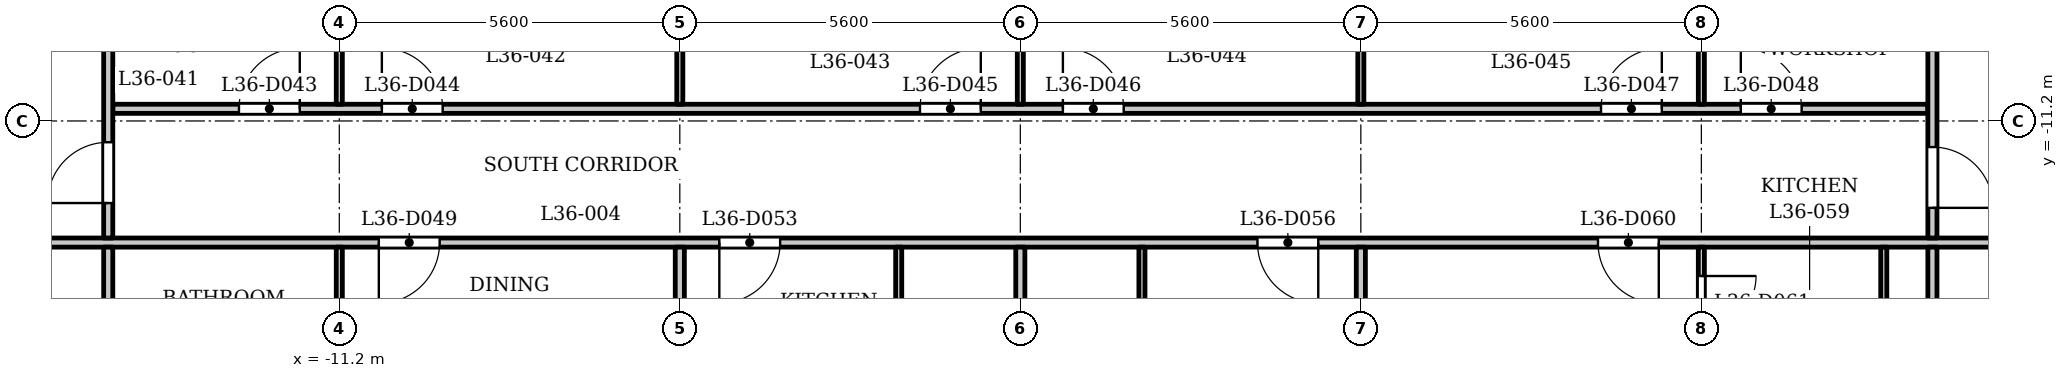
"""IFC4 building model, lengths in metres.
Left out: names, types, materials, properties, quantities, classifications, styles, units other than length and angle.
Written with IfcOpenShell. Run it as: python <this file> out.ifc"""

import sys

from ifc_helpers import new_model, si_unit, direction, frame, frame_2d, origin, place, context, subcontext, project, spatial, rectangle, extrude, element, fill, save


model = new_model("IFC4")
c1 = context("Model", 3, precision=1e-05, world=origin(), true_north=direction((0.0, 1.0)))
c2 = subcontext(c1, "Body", "Model", "MODEL_VIEW")
j1 = project(units=[si_unit("LENGTHUNIT", "METRE"), si_unit("PLANEANGLEUNIT", "RADIAN")], contexts=[c1])
p1 = place(None, origin())
s1 = spatial("IfcSite", under=j1, at=p1, CompositionType="ELEMENT")
p2 = place(p1, origin())
s2 = spatial("IfcBuilding", under=s1, at=p2, CompositionType="ELEMENT")
p3 = place(p2, frame((0.0, 0.0, 143.1)))
s3 = spatial("IfcBuildingStorey", under=s2, at=p3, CompositionType="ELEMENT", Elevation=143.1)
p4 = place(p3, frame((-17.4, -13.2, 0.0), z_axis=(0.0, 0.0, 1.0), x_axis=(1.0, 0.0, 0.0)))
e1 = element("IfcWall", 1, at=p4, inside=s3, PredefinedType="PARTITIONING", context=c2, shape_type="SweptSolid", body=[
    extrude(rectangle(XDim=34.8, YDim=0.15, at=frame_2d((17.4, 0.0))), origin(), (0.0, 0.0, 1.0), 3.2),
])
p5 = place(p4, frame((0.15, 0.0, 0.0)))
e2 = element("IfcOpeningElement", 2, at=p5, cuts=e1, PredefinedType="OPENING", context=c2, shape_type="SweptSolid", body=[
    extrude(rectangle(XDim=1.0, YDim=2.1, at=frame_2d((0.5, 1.05))), frame((0.0, 0.085, 0.0), z_axis=(0.0, -1.0, 0.0), x_axis=(1.0, 0.0, 0.0)), (0.0, 0.0, 1.0), 0.17),
])
p6 = place(p4, frame((33.55, 0.0, 0.0)))
e3 = element("IfcOpeningElement", 3, at=p6, cuts=e1, PredefinedType="OPENING", context=c2, shape_type="SweptSolid", body=[
    extrude(rectangle(XDim=1.0, YDim=2.1, at=frame_2d((0.5, 1.05))), frame((0.0, 0.085, 0.0), z_axis=(0.0, -1.0, 0.0), x_axis=(1.0, 0.0, 0.0)), (0.0, 0.0, 1.0), 0.17),
])
p7 = place(p4, frame((6.85, 0.0, 0.0)))
e4 = element("IfcOpeningElement", 4, at=p7, cuts=e1, PredefinedType="OPENING", context=c2, shape_type="SweptSolid", body=[
    extrude(rectangle(XDim=1.0, YDim=2.1, at=frame_2d((0.5, 1.05))), frame((0.0, 0.085, 0.0), z_axis=(0.0, -1.0, 0.0), x_axis=(1.0, 0.0, 0.0)), (0.0, 0.0, 1.0), 0.17),
])
p8 = place(p4, frame((12.45, 0.0, 0.0)))
e5 = element("IfcOpeningElement", 5, at=p8, cuts=e1, PredefinedType="OPENING", context=c2, shape_type="SweptSolid", body=[
    extrude(rectangle(XDim=1.0, YDim=2.1, at=frame_2d((0.5, 1.05))), frame((0.0, 0.085, 0.0), z_axis=(0.0, -1.0, 0.0), x_axis=(1.0, 0.0, 0.0)), (0.0, 0.0, 1.0), 0.17),
])
p9 = place(p4, frame((21.3, 0.0, 0.0)))
e6 = element("IfcOpeningElement", 6, at=p9, cuts=e1, PredefinedType="OPENING", context=c2, shape_type="SweptSolid", body=[
    extrude(rectangle(XDim=1.0, YDim=2.1, at=frame_2d((0.5, 1.05))), frame((0.0, 0.085, 0.0), z_axis=(0.0, -1.0, 0.0), x_axis=(1.0, 0.0, 0.0)), (0.0, 0.0, 1.0), 0.17),
])
p10 = place(p4, frame((26.9, 0.0, 0.0)))
e7 = element("IfcOpeningElement", 7, at=p10, cuts=e1, PredefinedType="OPENING", context=c2, shape_type="SweptSolid", body=[
    extrude(rectangle(XDim=1.0, YDim=2.1, at=frame_2d((0.5, 1.05))), frame((0.0, 0.085, 0.0), z_axis=(0.0, -1.0, 0.0), x_axis=(1.0, 0.0, 0.0)), (0.0, 0.0, 1.0), 0.17),
])
p11 = place(p3, frame((-14.925, -11.0, 0.0), z_axis=(0.0, 0.0, 1.0), x_axis=(1.0, 0.0, 0.0)))
e8 = element("IfcWall", 8, at=p11, inside=s3, PredefinedType="PARTITIONING", context=c2, shape_type="SweptSolid", body=[
    extrude(rectangle(XDim=29.85, YDim=0.15, at=frame_2d((14.925, 0.0))), origin(), (0.0, 0.0, 1.0), 3.2),
])
p12 = place(p11, frame((2.075, 0.0, 0.0)))
e9 = element("IfcOpeningElement", 9, at=p12, cuts=e8, PredefinedType="OPENING", context=c2, shape_type="SweptSolid", body=[
    extrude(rectangle(XDim=1.0, YDim=2.1, at=frame_2d((0.5, 1.05))), frame((0.0, 0.085, 0.0), z_axis=(0.0, -1.0, 0.0), x_axis=(1.0, 0.0, 0.0)), (0.0, 0.0, 1.0), 0.17),
])
p13 = place(p11, frame((4.425, 0.0, 0.0)))
e10 = element("IfcOpeningElement", 10, at=p13, cuts=e8, PredefinedType="OPENING", context=c2, shape_type="SweptSolid", body=[
    extrude(rectangle(XDim=1.0, YDim=2.1, at=frame_2d((0.5, 1.05))), frame((0.0, 0.085, 0.0), z_axis=(0.0, -1.0, 0.0), x_axis=(1.0, 0.0, 0.0)), (0.0, 0.0, 1.0), 0.17),
])
p14 = place(p11, frame((13.275, 0.0, 0.0)))
e11 = element("IfcOpeningElement", 11, at=p14, cuts=e8, PredefinedType="OPENING", context=c2, shape_type="SweptSolid", body=[
    extrude(rectangle(XDim=1.0, YDim=2.1, at=frame_2d((0.5, 1.05))), frame((0.0, 0.085, 0.0), z_axis=(0.0, -1.0, 0.0), x_axis=(1.0, 0.0, 0.0)), (0.0, 0.0, 1.0), 0.17),
])
p15 = place(p11, frame((15.625, 0.0, 0.0)))
e12 = element("IfcOpeningElement", 12, at=p15, cuts=e8, PredefinedType="OPENING", context=c2, shape_type="SweptSolid", body=[
    extrude(rectangle(XDim=1.0, YDim=2.1, at=frame_2d((0.5, 1.05))), frame((0.0, 0.085, 0.0), z_axis=(0.0, -1.0, 0.0), x_axis=(1.0, 0.0, 0.0)), (0.0, 0.0, 1.0), 0.17),
])
p16 = place(p11, frame((24.475, 0.0, 0.0)))
e13 = element("IfcOpeningElement", 13, at=p16, cuts=e8, PredefinedType="OPENING", context=c2, shape_type="SweptSolid", body=[
    extrude(rectangle(XDim=1.0, YDim=2.1, at=frame_2d((0.5, 1.05))), frame((0.0, 0.085, 0.0), z_axis=(0.0, -1.0, 0.0), x_axis=(1.0, 0.0, 0.0)), (0.0, 0.0, 1.0), 0.17),
])
p17 = place(p11, frame((26.774, 0.0, 0.0)))
e14 = element("IfcOpeningElement", 14, at=p17, cuts=e8, PredefinedType="OPENING", context=c2, shape_type="SweptSolid", body=[
    extrude(rectangle(XDim=1.0, YDim=2.1, at=frame_2d((0.5, 1.05))), frame((0.0, 0.085, 0.0), z_axis=(0.0, -1.0, 0.0), x_axis=(1.0, 0.0, 0.0)), (0.0, 0.0, 1.0), 0.17),
])
p18 = place(p3, frame((-15.0, -15.325, 0.0), z_axis=(0.0, 0.0, 1.0), x_axis=(0.0, 1.0, 0.0)))
e15 = element("IfcWall", 15, at=p18, inside=s3, PredefinedType="PARTITIONING", context=c2, shape_type="SweptSolid", body=[
    extrude(rectangle(XDim=2.05, YDim=0.15, at=frame_2d((1.025, 0.0))), origin(), (0.0, 0.0, 1.0), 3.2),
])
p19 = place(p3, frame((-15.0, -13.125, 0.0), z_axis=(0.0, 0.0, 1.0), x_axis=(0.0, 1.0, 0.0)))
e16 = element("IfcWall", 16, at=p19, inside=s3, PredefinedType="PARTITIONING", context=c2, shape_type="SweptSolid", body=[
    extrude(rectangle(XDim=6.356, YDim=0.15, at=frame_2d((3.178, 0.0))), origin(), (0.0, 0.0, 1.0), 3.2),
])
p20 = place(p19, frame((0.575, 0.0, 0.0)))
e17 = element("IfcOpeningElement", 17, at=p20, cuts=e16, PredefinedType="OPENING", context=c2, shape_type="SweptSolid", body=[
    extrude(rectangle(XDim=1.0, YDim=2.1, at=frame_2d((0.5, 1.05))), frame((0.0, 0.085, 0.0), z_axis=(0.0, -1.0, 0.0), x_axis=(1.0, 0.0, 0.0)), (0.0, 0.0, 1.0), 0.17),
])
p21 = place(p3, frame((-11.2, -16.75, 0.0), z_axis=(0.0, 0.0, 1.0), x_axis=(0.0, 1.0, 0.0)))
e18 = element("IfcWall", 18, at=p21, inside=s3, PredefinedType="PARTITIONING", context=c2, shape_type="SweptSolid", body=[
    extrude(rectangle(XDim=3.475, YDim=0.1, at=frame_2d((1.738, 0.0))), origin(), (0.0, 0.0, 1.0), 3.2),
])
for number, where, z_axis, x_axis in (
    (19, (-11.2, -10.925, 0.0), (0.0, 0.0, 1.0), (0.0, 1.0, 0.0)),
    (20, (-5.6, -10.925, 0.0), (0.0, 0.0, 1.0), (0.0, 1.0, 0.0)),
):
    element("IfcWall", number, at=place(p3, frame(where, z_axis=z_axis, x_axis=x_axis)), inside=s3, PredefinedType="PARTITIONING", context=c2, shape_type="SweptSolid", body=[
        extrude(rectangle(XDim=3.605, YDim=0.1, at=frame_2d((1.802, 0.0))), origin(), (0.0, 0.0, 1.0), 3.2),
    ])
p22 = place(p3, frame((-5.6, -16.75, 0.0), z_axis=(0.0, 0.0, 1.0), x_axis=(0.0, 1.0, 0.0)))
e21 = element("IfcWall", 21, at=p22, inside=s3, PredefinedType="PARTITIONING", context=c2, shape_type="SweptSolid", body=[
    extrude(rectangle(XDim=3.475, YDim=0.15, at=frame_2d((1.738, 0.0))), origin(), (0.0, 0.0, 1.0), 3.2),
])
p23 = place(p3, frame((-2.0, -16.75, 0.0), z_axis=(0.0, 0.0, 1.0), x_axis=(0.0, 1.0, 0.0)))
e22 = element("IfcWall", 22, at=p23, inside=s3, PredefinedType="PARTITIONING", context=c2, shape_type="SweptSolid", body=[
    extrude(rectangle(XDim=3.475, YDim=0.1, at=frame_2d((1.738, 0.0))), origin(), (0.0, 0.0, 1.0), 3.2),
])
p24 = place(p3, frame((0.0, -10.925, 0.0), z_axis=(0.0, 0.0, 1.0), x_axis=(0.0, 1.0, 0.0)))
e23 = element("IfcWall", 23, at=p24, inside=s3, PredefinedType="PARTITIONING", context=c2, shape_type="SweptSolid", body=[
    extrude(rectangle(XDim=3.605, YDim=0.1, at=frame_2d((1.802, 0.0))), origin(), (0.0, 0.0, 1.0), 3.2),
])
p25 = place(p3, frame((0.0, -16.75, 0.0), z_axis=(0.0, 0.0, 1.0), x_axis=(0.0, 1.0, 0.0)))
e24 = element("IfcWall", 24, at=p25, inside=s3, PredefinedType="PARTITIONING", context=c2, shape_type="SweptSolid", body=[
    extrude(rectangle(XDim=3.475, YDim=0.15, at=frame_2d((1.738, 0.0))), origin(), (0.0, 0.0, 1.0), 3.2),
])
p26 = place(p3, frame((2.0, -16.75, 0.0), z_axis=(0.0, 0.0, 1.0), x_axis=(0.0, 1.0, 0.0)))
e25 = element("IfcWall", 25, at=p26, inside=s3, PredefinedType="PARTITIONING", context=c2, shape_type="SweptSolid", body=[
    extrude(rectangle(XDim=3.475, YDim=0.1, at=frame_2d((1.738, 0.0))), origin(), (0.0, 0.0, 1.0), 3.2),
])
p27 = place(p3, frame((5.6, -10.925, 0.0), z_axis=(0.0, 0.0, 1.0), x_axis=(0.0, 1.0, 0.0)))
e26 = element("IfcWall", 26, at=p27, inside=s3, PredefinedType="PARTITIONING", context=c2, shape_type="SweptSolid", body=[
    extrude(rectangle(XDim=3.605, YDim=0.1, at=frame_2d((1.802, 0.0))), origin(), (0.0, 0.0, 1.0), 3.2),
])
p28 = place(p3, frame((5.6, -16.75, 0.0), z_axis=(0.0, 0.0, 1.0), x_axis=(0.0, 1.0, 0.0)))
e27 = element("IfcWall", 27, at=p28, inside=s3, PredefinedType="PARTITIONING", context=c2, shape_type="SweptSolid", body=[
    extrude(rectangle(XDim=3.475, YDim=0.15, at=frame_2d((1.738, 0.0))), origin(), (0.0, 0.0, 1.0), 3.2),
])
p29 = place(p3, frame((11.2, -16.75, 0.0), z_axis=(0.0, 0.0, 1.0), x_axis=(0.0, 1.0, 0.0)))
e28 = element("IfcWall", 28, at=p29, inside=s3, PredefinedType="PARTITIONING", context=c2, shape_type="SweptSolid", body=[
    extrude(rectangle(XDim=3.475, YDim=0.1, at=frame_2d((1.738, 0.0))), origin(), (0.0, 0.0, 1.0), 3.2),
])
p30 = place(p29, frame((2.1, 0.0, 0.0)))
e29 = element("IfcOpeningElement", 29, at=p30, cuts=e28, PredefinedType="OPENING", context=c2, shape_type="SweptSolid", body=[
    extrude(rectangle(XDim=0.9, YDim=2.1, at=frame_2d((0.45, 1.05))), frame((0.0, 0.06, 0.0), z_axis=(0.0, -1.0, 0.0), x_axis=(1.0, 0.0, 0.0)), (0.0, 0.0, 1.0), 0.12),
])
p31 = place(p3, frame((11.2, -10.925, 0.0), z_axis=(0.0, 0.0, 1.0), x_axis=(0.0, 1.0, 0.0)))
e30 = element("IfcWall", 30, at=p31, inside=s3, PredefinedType="PARTITIONING", context=c2, shape_type="SweptSolid", body=[
    extrude(rectangle(XDim=3.605, YDim=0.1, at=frame_2d((1.802, 0.0))), origin(), (0.0, 0.0, 1.0), 3.2),
])
p32 = place(p3, frame((14.2, -16.75, 0.0), z_axis=(0.0, 0.0, 1.0), x_axis=(0.0, 1.0, 0.0)))
e31 = element("IfcWall", 31, at=p32, inside=s3, PredefinedType="PARTITIONING", context=c2, shape_type="SweptSolid", body=[
    extrude(rectangle(XDim=3.475, YDim=0.1, at=frame_2d((1.738, 0.0))), origin(), (0.0, 0.0, 1.0), 3.2),
])
p33 = place(p3, frame((15.0, -15.325, 0.0), z_axis=(0.0, 0.0, 1.0), x_axis=(0.0, 1.0, 0.0)))
e32 = element("IfcWall", 32, at=p33, inside=s3, PredefinedType="PARTITIONING", context=c2, shape_type="SweptSolid", body=[
    extrude(rectangle(XDim=2.05, YDim=0.15, at=frame_2d((1.025, 0.0))), origin(), (0.0, 0.0, 1.0), 3.2),
])
p34 = place(p3, frame((15.0, -13.125, 0.0), z_axis=(0.0, 0.0, 1.0), x_axis=(0.0, 1.0, 0.0)))
e33 = element("IfcWall", 33, at=p34, inside=s3, PredefinedType="PARTITIONING", context=c2, shape_type="SweptSolid", body=[
    extrude(rectangle(XDim=6.356, YDim=0.15, at=frame_2d((3.178, 0.0))), origin(), (0.0, 0.0, 1.0), 3.2),
])
p35 = place(p34, frame((0.496, 0.0, 0.0)))
e34 = element("IfcOpeningElement", 34, at=p35, cuts=e33, PredefinedType="OPENING", context=c2, shape_type="SweptSolid", body=[
    extrude(rectangle(XDim=1.0, YDim=2.1, at=frame_2d((0.5, 1.05))), frame((0.0, 0.085, 0.0), z_axis=(0.0, -1.0, 0.0), x_axis=(1.0, 0.0, 0.0)), (0.0, 0.0, 1.0), 0.17),
])
p36 = place(p20, origin())
e35 = element("IfcDoor", 35, at=p36, inside=s3, OperationType="SINGLE_SWING_RIGHT", PredefinedType="DOOR", context=c2, shape_type="SweptSolid", body=[
    extrude(rectangle(XDim=1.0, YDim=2.1, at=frame_2d((0.5, 1.05))), frame((0.0, 0.025, 0.0), z_axis=(0.0, -1.0, 0.0), x_axis=(1.0, 0.0, 0.0)), (0.0, 0.0, 1.0), 0.05),
])
fill(e17, e35)
p37 = place(p35, origin())
e36 = element("IfcDoor", 36, at=p37, inside=s3, OperationType="SINGLE_SWING_LEFT", PredefinedType="DOOR", context=c2, shape_type="SweptSolid", body=[
    extrude(rectangle(XDim=1.0, YDim=2.1, at=frame_2d((0.5, 1.05))), frame((0.0, 0.025, 0.0), z_axis=(0.0, -1.0, 0.0), x_axis=(1.0, 0.0, 0.0)), (0.0, 0.0, 1.0), 0.05),
])
fill(e34, e36)
p38 = place(p12, origin())
e37 = element("IfcDoor", 37, at=p38, inside=s3, OperationType="SINGLE_SWING_LEFT", PredefinedType="DOOR", context=c2, shape_type="SweptSolid", body=[
    extrude(rectangle(XDim=1.0, YDim=2.1, at=frame_2d((0.5, 1.05))), frame((0.0, 0.025, 0.0), z_axis=(0.0, -1.0, 0.0), x_axis=(1.0, 0.0, 0.0)), (0.0, 0.0, 1.0), 0.05),
])
fill(e9, e37)
p39 = place(p13, origin())
e38 = element("IfcDoor", 38, at=p39, inside=s3, OperationType="SINGLE_SWING_RIGHT", PredefinedType="DOOR", context=c2, shape_type="SweptSolid", body=[
    extrude(rectangle(XDim=1.0, YDim=2.1, at=frame_2d((0.5, 1.05))), frame((0.0, 0.025, 0.0), z_axis=(0.0, -1.0, 0.0), x_axis=(1.0, 0.0, 0.0)), (0.0, 0.0, 1.0), 0.05),
])
fill(e10, e38)
p40 = place(p14, origin())
e39 = element("IfcDoor", 39, at=p40, inside=s3, OperationType="SINGLE_SWING_LEFT", PredefinedType="DOOR", context=c2, shape_type="SweptSolid", body=[
    extrude(rectangle(XDim=1.0, YDim=2.1, at=frame_2d((0.5, 1.05))), frame((0.0, 0.025, 0.0), z_axis=(0.0, -1.0, 0.0), x_axis=(1.0, 0.0, 0.0)), (0.0, 0.0, 1.0), 0.05),
])
fill(e11, e39)
p41 = place(p15, origin())
e40 = element("IfcDoor", 40, at=p41, inside=s3, OperationType="SINGLE_SWING_RIGHT", PredefinedType="DOOR", context=c2, shape_type="SweptSolid", body=[
    extrude(rectangle(XDim=1.0, YDim=2.1, at=frame_2d((0.5, 1.05))), frame((0.0, 0.025, 0.0), z_axis=(0.0, -1.0, 0.0), x_axis=(1.0, 0.0, 0.0)), (0.0, 0.0, 1.0), 0.05),
])
fill(e12, e40)
p42 = place(p16, origin())
e41 = element("IfcDoor", 41, at=p42, inside=s3, OperationType="SINGLE_SWING_LEFT", PredefinedType="DOOR", context=c2, shape_type="SweptSolid", body=[
    extrude(rectangle(XDim=1.0, YDim=2.1, at=frame_2d((0.5, 1.05))), frame((0.0, 0.025, 0.0), z_axis=(0.0, -1.0, 0.0), x_axis=(1.0, 0.0, 0.0)), (0.0, 0.0, 1.0), 0.05),
])
fill(e13, e41)
p43 = place(p17, origin())
e42 = element("IfcDoor", 42, at=p43, inside=s3, OperationType="SINGLE_SWING_RIGHT", PredefinedType="DOOR", context=c2, shape_type="SweptSolid", body=[
    extrude(rectangle(XDim=1.0, YDim=2.1, at=frame_2d((0.5, 1.05))), frame((0.0, 0.025, 0.0), z_axis=(0.0, -1.0, 0.0), x_axis=(1.0, 0.0, 0.0)), (0.0, 0.0, 1.0), 0.05),
])
fill(e14, e42)
p44 = place(p7, origin())
e43 = element("IfcDoor", 43, at=p44, inside=s3, OperationType="SINGLE_SWING_LEFT", PredefinedType="DOOR", context=c2, shape_type="SweptSolid", body=[
    extrude(rectangle(XDim=1.0, YDim=2.1, at=frame_2d((0.5, 1.05))), frame((0.0, 0.025, 0.0), z_axis=(0.0, -1.0, 0.0), x_axis=(1.0, 0.0, 0.0)), (0.0, 0.0, 1.0), 0.05),
])
fill(e4, e43)
p45 = place(p8, origin())
e44 = element("IfcDoor", 44, at=p45, inside=s3, OperationType="SINGLE_SWING_LEFT", PredefinedType="DOOR", context=c2, shape_type="SweptSolid", body=[
    extrude(rectangle(XDim=1.0, YDim=2.1, at=frame_2d((0.5, 1.05))), frame((0.0, 0.025, 0.0), z_axis=(0.0, -1.0, 0.0), x_axis=(1.0, 0.0, 0.0)), (0.0, 0.0, 1.0), 0.05),
])
fill(e5, e44)
p46 = place(p9, origin())
e45 = element("IfcDoor", 45, at=p46, inside=s3, OperationType="SINGLE_SWING_RIGHT", PredefinedType="DOOR", context=c2, shape_type="SweptSolid", body=[
    extrude(rectangle(XDim=1.0, YDim=2.1, at=frame_2d((0.5, 1.05))), frame((0.0, 0.025, 0.0), z_axis=(0.0, -1.0, 0.0), x_axis=(1.0, 0.0, 0.0)), (0.0, 0.0, 1.0), 0.05),
])
fill(e6, e45)
p47 = place(p10, origin())
e46 = element("IfcDoor", 46, at=p47, inside=s3, OperationType="SINGLE_SWING_RIGHT", PredefinedType="DOOR", context=c2, shape_type="SweptSolid", body=[
    extrude(rectangle(XDim=1.0, YDim=2.1, at=frame_2d((0.5, 1.05))), frame((0.0, 0.025, 0.0), z_axis=(0.0, -1.0, 0.0), x_axis=(1.0, 0.0, 0.0)), (0.0, 0.0, 1.0), 0.05),
])
fill(e7, e46)
p48 = place(p30, origin())
e47 = element("IfcDoor", 47, at=p48, inside=s3, OperationType="SINGLE_SWING_RIGHT", PredefinedType="DOOR", context=c2, shape_type="SweptSolid", body=[
    extrude(rectangle(XDim=0.9, YDim=2.1, at=frame_2d((0.45, 1.05))), frame((0.0, 0.025, 0.0), z_axis=(0.0, -1.0, 0.0), x_axis=(1.0, 0.0, 0.0)), (0.0, 0.0, 1.0), 0.05),
])
fill(e29, e47)
save(model, sys.argv[1])
